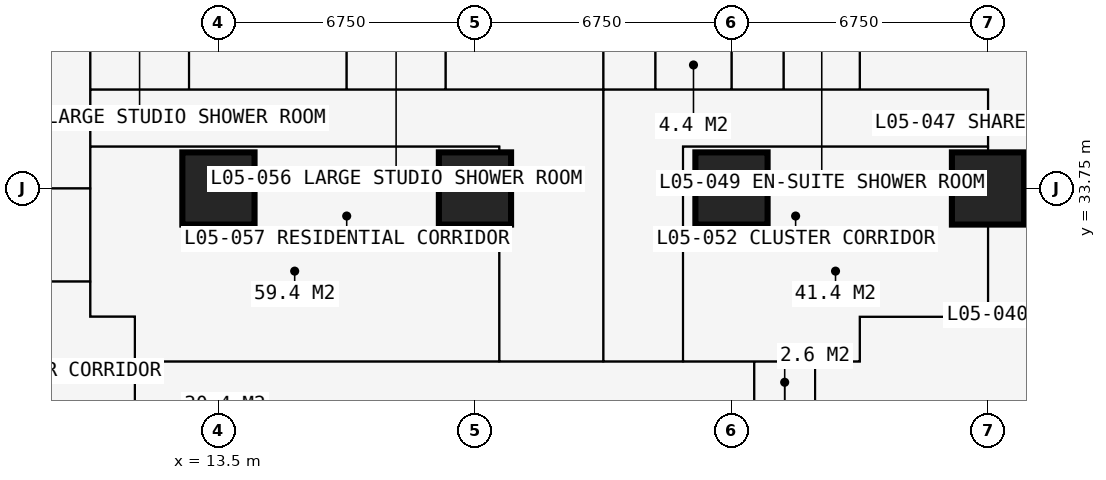
"""IFC4 building model, lengths in metres.
Left out: names, types, materials, properties, quantities, classifications, styles, units other than length and angle.
Written with IfcOpenShell. Run it as: python <this file> out.ifc"""

import sys

from ifc_helpers import new_model, si_unit, direction, frame, frame_2d, origin, origin_2d, place, context, subcontext, project, spatial, rectangle, extrude, element, fill, save


model = new_model("IFC4")
c1 = context("Model", 3, precision=1e-05, world=origin(), true_north=direction((0.0, 1.0)))
c2 = subcontext(c1, "Body", "Model", "MODEL_VIEW")
j1 = project(units=[si_unit("LENGTHUNIT", "METRE"), si_unit("PLANEANGLEUNIT", "RADIAN")], contexts=[c1])
p1 = place(None, origin())
s1 = spatial("IfcSite", under=j1, at=p1, CompositionType="ELEMENT")
p2 = place(p1, origin())
s2 = spatial("IfcBuilding", under=s1, at=p2, CompositionType="ELEMENT")
p3 = place(p2, frame((0.0, 0.0, 21.6)))
s3 = spatial("IfcBuildingStorey", under=s2, at=p3, CompositionType="ELEMENT", Elevation=21.6)
for number, where, z_axis, x_axis in (
    (1, (13.5, 33.75, 0.0), (0.0, 0.0, 1.0), (1.0, 0.0, 0.0)),
    (2, (20.25, 33.75, 0.0), (0.0, 0.0, 1.0), (1.0, 0.0, 0.0)),
    (3, (27.0, 33.75, 0.0), (0.0, 0.0, 1.0), (1.0, 0.0, 0.0)),
    (4, (33.75, 33.75, 0.0), (0.0, 0.0, 1.0), (1.0, 0.0, 0.0)),
):
    element("IfcColumn", number, at=place(p3, frame(where, z_axis=z_axis, x_axis=x_axis)), inside=s3, PredefinedType="COLUMN", context=c2, shape_type="SweptSolid", body=[
        extrude(rectangle(XDim=1.9, YDim=1.9, at=origin_2d()), origin(), (0.0, 0.0, 1.0), 3.6),
    ])
p4 = place(p3, frame((-0.734, 33.75, 0.0), z_axis=(0.0, 0.0, 1.0), x_axis=(1.0, 0.0, 0.0)))
e5 = element("IfcWall", 5, at=p4, inside=s3, PredefinedType="PARTITIONING", context=c2, shape_type="SweptSolid", body=[
    extrude(rectangle(XDim=10.859, YDim=0.15, at=frame_2d((5.429, 0.0))), origin(), (0.0, 0.0, 1.0), 2.877),
])
p5 = place(p4, frame((8.434, 0.0, 0.0)))
e6 = element("IfcOpeningElement", 6, at=p5, cuts=e5, PredefinedType="OPENING", context=c2, shape_type="SweptSolid", body=[
    extrude(rectangle(XDim=1.0, YDim=2.2, at=frame_2d((0.5, 1.1))), frame((0.0, 0.085, 0.0), z_axis=(0.0, -1.0, 0.0), x_axis=(1.0, 0.0, 0.0)), (0.0, 0.0, 1.0), 0.17),
])
p6 = place(p3, frame((5.65, 31.3, 0.0), z_axis=(0.0, 0.0, 1.0), x_axis=(1.0, 0.0, 0.0)))
e7 = element("IfcWall", 7, at=p6, inside=s3, PredefinedType="PARTITIONING", context=c2, shape_type="SweptSolid", body=[
    extrude(rectangle(XDim=4.475, YDim=0.15, at=frame_2d((2.238, 0.0))), origin(), (0.0, 0.0, 1.0), 3.375),
])
p7 = place(p3, frame((10.125, 30.375, 0.0), z_axis=(0.0, 0.0, 1.0), x_axis=(0.0, 1.0, 0.0)))
e8 = element("IfcWall", 8, at=p7, inside=s3, PredefinedType="PARTITIONING", context=c2, shape_type="SweptSolid", body=[
    extrude(rectangle(XDim=10.859, YDim=0.15, at=frame_2d((5.429, 0.0))), origin(), (0.0, 0.0, 1.0), 3.375),
])
p8 = place(p3, frame((10.125, 30.375, 0.0), z_axis=(0.0, 0.0, 1.0), x_axis=(1.0, 0.0, 0.0)))
e9 = element("IfcWall", 9, at=p8, inside=s3, PredefinedType="PARTITIONING", context=c2, shape_type="SweptSolid", body=[
    extrude(rectangle(XDim=1.175, YDim=0.15, at=frame_2d((0.587, 0.0))), origin(), (0.0, 0.0, 1.0), 3.375),
])
p9 = place(p3, frame((10.125, 34.85, 0.0), z_axis=(0.0, 0.0, 1.0), x_axis=(1.0, 0.0, 0.0)))
e10 = element("IfcWall", 10, at=p9, inside=s3, PredefinedType="PARTITIONING", context=c2, shape_type="SweptSolid", body=[
    extrude(rectangle(XDim=10.762, YDim=0.15, at=frame_2d((5.381, 0.0))), origin(), (0.0, 0.0, 1.0), 3.375),
])
p10 = place(p9, frame((4.9, 0.0, 0.0)))
e11 = element("IfcOpeningElement", 11, at=p10, cuts=e10, PredefinedType="OPENING", context=c2, shape_type="SweptSolid", body=[
    extrude(rectangle(XDim=0.95, YDim=2.2, at=frame_2d((0.475, 1.1))), frame((0.0, 0.085, 0.0), z_axis=(0.0, -1.0, 0.0), x_axis=(1.0, 0.0, 0.0)), (0.0, 0.0, 1.0), 0.17),
])
p11 = place(p3, frame((10.125, 36.35, 0.0), z_axis=(0.0, 0.0, 1.0), x_axis=(1.0, 0.0, 0.0)))
e12 = element("IfcWall", 12, at=p11, inside=s3, PredefinedType="PARTITIONING", context=c2, shape_type="SweptSolid", body=[
    extrude(rectangle(XDim=23.625, YDim=0.15, at=frame_2d((11.812, 0.0))), origin(), (0.0, 0.0, 1.0), 3.375),
])
p12 = place(p11, frame((21.45, 0.0, 0.0)))
e13 = element("IfcOpeningElement", 13, at=p12, cuts=e12, PredefinedType="OPENING", context=c2, shape_type="SweptSolid", body=[
    extrude(rectangle(XDim=1.0, YDim=2.2, at=frame_2d((0.5, 1.1))), frame((0.0, 0.085, 0.0), z_axis=(0.0, -1.0, 0.0), x_axis=(1.0, 0.0, 0.0)), (0.0, 0.0, 1.0), 0.17),
])
p13 = place(p11, frame((17.125, 0.0, 0.0)))
e14 = element("IfcOpeningElement", 14, at=p13, cuts=e12, PredefinedType="OPENING", context=c2, shape_type="SweptSolid", body=[
    extrude(rectangle(XDim=0.95, YDim=2.2, at=frame_2d((0.475, 1.1))), frame((0.0, 0.085, 0.0), z_axis=(0.0, -1.0, 0.0), x_axis=(1.0, 0.0, 0.0)), (0.0, 0.0, 1.0), 0.17),
])
p14 = place(p11, frame((13.7, 0.0, 0.0)))
e15 = element("IfcOpeningElement", 15, at=p14, cuts=e12, PredefinedType="OPENING", context=c2, shape_type="SweptSolid", body=[
    extrude(rectangle(XDim=0.95, YDim=2.2, at=frame_2d((0.475, 1.1))), frame((0.0, 0.085, 0.0), z_axis=(0.0, -1.0, 0.0), x_axis=(1.0, 0.0, 0.0)), (0.0, 0.0, 1.0), 0.17),
])
p15 = place(p11, frame((4.2, 0.0, 0.0)))
e16 = element("IfcOpeningElement", 16, at=p15, cuts=e12, PredefinedType="OPENING", context=c2, shape_type="SweptSolid", body=[
    extrude(rectangle(XDim=0.95, YDim=2.2, at=frame_2d((0.475, 1.1))), frame((0.0, 0.085, 0.0), z_axis=(0.0, -1.0, 0.0), x_axis=(1.0, 0.0, 0.0)), (0.0, 0.0, 1.0), 0.17),
])
p16 = place(p11, frame((10.95, 0.0, 0.0)))
e17 = element("IfcOpeningElement", 17, at=p16, cuts=e12, PredefinedType="OPENING", context=c2, shape_type="SweptSolid", body=[
    extrude(rectangle(XDim=0.95, YDim=2.2, at=frame_2d((0.475, 1.1))), frame((0.0, 0.085, 0.0), z_axis=(0.0, -1.0, 0.0), x_axis=(1.0, 0.0, 0.0)), (0.0, 0.0, 1.0), 0.17),
])
p17 = place(p3, frame((11.3, 11.3, 0.0), z_axis=(0.0, 0.0, 1.0), x_axis=(0.0, 1.0, 0.0)))
e18 = element("IfcWall", 18, at=p17, inside=s3, PredefinedType="PARTITIONING", context=c2, shape_type="SweptSolid", body=[
    extrude(rectangle(XDim=19.075, YDim=0.15, at=frame_2d((9.538, 0.0))), origin(), (0.0, 0.0, 1.0), 3.375),
])
p18 = place(p17, frame((12.875, 0.0, 0.0)))
e19 = element("IfcOpeningElement", 19, at=p18, cuts=e18, PredefinedType="OPENING", context=c2, shape_type="SweptSolid", body=[
    extrude(rectangle(XDim=1.0, YDim=2.2, at=frame_2d((0.5, 1.1))), frame((0.0, 0.085, 0.0), z_axis=(0.0, -1.0, 0.0), x_axis=(1.0, 0.0, 0.0)), (0.0, 0.0, 1.0), 0.17),
])
p19 = place(p17, frame((10.438, 0.0, 0.0)))
e20 = element("IfcOpeningElement", 20, at=p19, cuts=e18, PredefinedType="OPENING", context=c2, shape_type="SweptSolid", body=[
    extrude(rectangle(XDim=1.0, YDim=2.2, at=frame_2d((0.5, 1.1))), frame((0.0, 0.085, 0.0), z_axis=(0.0, -1.0, 0.0), x_axis=(1.0, 0.0, 0.0)), (0.0, 0.0, 1.0), 0.17),
])
p20 = place(p17, frame((15.675, 0.0, 0.0)))
e21 = element("IfcOpeningElement", 21, at=p20, cuts=e18, PredefinedType="OPENING", context=c2, shape_type="SweptSolid", body=[
    extrude(rectangle(XDim=0.95, YDim=2.2, at=frame_2d((0.475, 1.1))), frame((0.0, 0.085, 0.0), z_axis=(0.0, -1.0, 0.0), x_axis=(1.0, 0.0, 0.0)), (0.0, 0.0, 1.0), 0.17),
])
p21 = place(p3, frame((11.3, 29.2, 0.0), z_axis=(0.0, 0.0, 1.0), x_axis=(1.0, 0.0, 0.0)))
e22 = element("IfcWall", 22, at=p21, inside=s3, PredefinedType="PARTITIONING", context=c2, shape_type="SweptSolid", body=[
    extrude(rectangle(XDim=19.075, YDim=0.15, at=frame_2d((9.538, 0.0))), origin(), (0.0, 0.0, 1.0), 3.375),
])
p22 = place(p21, frame((12.875, 0.0, 0.0)))
e23 = element("IfcOpeningElement", 23, at=p22, cuts=e22, PredefinedType="OPENING", context=c2, shape_type="SweptSolid", body=[
    extrude(rectangle(XDim=1.0, YDim=2.2, at=frame_2d((0.5, 1.1))), frame((0.0, 0.085, 0.0), z_axis=(0.0, -1.0, 0.0), x_axis=(1.0, 0.0, 0.0)), (0.0, 0.0, 1.0), 0.17),
])
p23 = place(p21, frame((10.438, 0.0, 0.0)))
e24 = element("IfcOpeningElement", 24, at=p23, cuts=e22, PredefinedType="OPENING", context=c2, shape_type="SweptSolid", body=[
    extrude(rectangle(XDim=1.0, YDim=2.2, at=frame_2d((0.5, 1.1))), frame((0.0, 0.085, 0.0), z_axis=(0.0, -1.0, 0.0), x_axis=(1.0, 0.0, 0.0)), (0.0, 0.0, 1.0), 0.17),
])
p24 = place(p21, frame((14.875, 0.0, 0.0)))
e25 = element("IfcOpeningElement", 25, at=p24, cuts=e22, PredefinedType="OPENING", context=c2, shape_type="SweptSolid", body=[
    extrude(rectangle(XDim=0.95, YDim=2.2, at=frame_2d((0.475, 1.1))), frame((0.0, 0.085, 0.0), z_axis=(0.0, -1.0, 0.0), x_axis=(1.0, 0.0, 0.0)), (0.0, 0.0, 1.0), 0.17),
])
p25 = place(p3, frame((12.725, 36.35, 0.0), z_axis=(0.0, 0.0, 1.0), x_axis=(0.0, 1.0, 0.0)))
e26 = element("IfcWall", 26, at=p25, inside=s3, PredefinedType="PARTITIONING", context=c2, shape_type="SweptSolid", body=[
    extrude(rectangle(XDim=2.4, YDim=0.1, at=frame_2d((1.2, 0.0))), origin(), (0.0, 0.0, 1.0), 3.375),
])
p26 = place(p3, frame((16.875, 36.35, 0.0), z_axis=(0.0, 0.0, 1.0), x_axis=(0.0, 1.0, 0.0)))
e27 = element("IfcWall", 27, at=p26, inside=s3, PredefinedType="PARTITIONING", context=c2, shape_type="SweptSolid", body=[
    extrude(rectangle(XDim=4.884, YDim=0.175, at=frame_2d((2.442, 0.0))), origin(), (0.0, 0.0, 1.0), 3.375),
])
p27 = place(p26, frame((0.75, 0.0, 0.0)))
e28 = element("IfcOpeningElement", 28, at=p27, cuts=e27, PredefinedType="OPENING", context=c2, shape_type="SweptSolid", body=[
    extrude(rectangle(XDim=0.9, YDim=2.2, at=frame_2d((0.45, 1.1))), frame((0.0, 0.097, 0.0), z_axis=(0.0, -1.0, 0.0), x_axis=(1.0, 0.0, 0.0)), (0.0, 0.0, 1.0), 0.195),
])
p28 = place(p3, frame((19.475, 36.35, 0.0), z_axis=(0.0, 0.0, 1.0), x_axis=(0.0, 1.0, 0.0)))
e29 = element("IfcWall", 29, at=p28, inside=s3, PredefinedType="PARTITIONING", context=c2, shape_type="SweptSolid", body=[
    extrude(rectangle(XDim=2.4, YDim=0.1, at=frame_2d((1.2, 0.0))), origin(), (0.0, 0.0, 1.0), 3.375),
])
p29 = place(p3, frame((20.887, 29.2, 0.0), z_axis=(0.0, 0.0, 1.0), x_axis=(0.0, 1.0, 0.0)))
e30 = element("IfcWall", 30, at=p29, inside=s3, PredefinedType="PARTITIONING", context=c2, shape_type="SweptSolid", body=[
    extrude(rectangle(XDim=5.65, YDim=0.15, at=frame_2d((2.825, 0.0))), origin(), (0.0, 0.0, 1.0), 3.375),
])
p30 = place(p3, frame((23.625, 29.2, 0.0), z_axis=(0.0, 0.0, 1.0), x_axis=(0.0, 1.0, 0.0)))
e31 = element("IfcWall", 31, at=p30, inside=s3, PredefinedType="PARTITIONING", context=c2, shape_type="SweptSolid", body=[
    extrude(rectangle(XDim=12.034, YDim=0.15, at=frame_2d((6.017, 0.0))), origin(), (0.0, 0.0, 1.0), 3.375),
])
p31 = place(p3, frame((25.0, 36.35, 0.0), z_axis=(0.0, 0.0, 1.0), x_axis=(0.0, 1.0, 0.0)))
e32 = element("IfcWall", 32, at=p31, inside=s3, PredefinedType="PARTITIONING", context=c2, shape_type="SweptSolid", body=[
    extrude(rectangle(XDim=2.2, YDim=0.1, at=frame_2d((1.1, 0.0))), origin(), (0.0, 0.0, 1.0), 3.375),
])
p32 = place(p3, frame((25.725, 29.2, 0.0), z_axis=(0.0, 0.0, 1.0), x_axis=(0.0, 1.0, 0.0)))
e33 = element("IfcWall", 33, at=p32, inside=s3, PredefinedType="PARTITIONING", context=c2, shape_type="SweptSolid", body=[
    extrude(rectangle(XDim=5.65, YDim=0.15, at=frame_2d((2.825, 0.0))), origin(), (0.0, 0.0, 1.0), 3.375),
])
p33 = place(p3, frame((25.725, 34.85, 0.0), z_axis=(0.0, 0.0, 1.0), x_axis=(1.0, 0.0, 0.0)))
e34 = element("IfcWall", 34, at=p33, inside=s3, PredefinedType="PARTITIONING", context=c2, shape_type="SweptSolid", body=[
    extrude(rectangle(XDim=8.025, YDim=0.15, at=frame_2d((4.012, 0.0))), origin(), (0.0, 0.0, 1.0), 3.375),
])
p34 = place(p3, frame((27.0, 36.35, 0.0), z_axis=(0.0, 0.0, 1.0), x_axis=(0.0, 1.0, 0.0)))
e35 = element("IfcWall", 35, at=p34, inside=s3, PredefinedType="PARTITIONING", context=c2, shape_type="SweptSolid", body=[
    extrude(rectangle(XDim=4.884, YDim=0.175, at=frame_2d((2.442, 0.0))), origin(), (0.0, 0.0, 1.0), 2.877),
])
p35 = place(p34, frame((0.65, 0.0, 0.0)))
e36 = element("IfcOpeningElement", 36, at=p35, cuts=e35, PredefinedType="OPENING", context=c2, shape_type="SweptSolid", body=[
    extrude(rectangle(XDim=0.9, YDim=2.2, at=frame_2d((0.45, 1.1))), frame((0.0, 0.097, 0.0), z_axis=(0.0, -1.0, 0.0), x_axis=(1.0, 0.0, 0.0)), (0.0, 0.0, 1.0), 0.195),
])
p36 = place(p3, frame((27.6, 27.6, 0.0), z_axis=(0.0, 0.0, 1.0), x_axis=(0.0, 1.0, 0.0)))
e37 = element("IfcWall", 37, at=p36, inside=s3, PredefinedType="PARTITIONING", context=c2, shape_type="SweptSolid", body=[
    extrude(rectangle(XDim=1.6, YDim=0.15, at=frame_2d((0.8, 0.0))), origin(), (0.0, 0.0, 1.0), 3.375),
])
p37 = place(p36, frame((0.3, 0.0, 0.0)))
e38 = element("IfcOpeningElement", 38, at=p37, cuts=e37, PredefinedType="OPENING", context=c2, shape_type="SweptSolid", body=[
    extrude(rectangle(XDim=0.95, YDim=2.2, at=frame_2d((0.475, 1.1))), frame((0.0, 0.085, 0.0), z_axis=(0.0, -1.0, 0.0), x_axis=(1.0, 0.0, 0.0)), (0.0, 0.0, 1.0), 0.17),
])
p38 = place(p3, frame((28.375, 36.35, 0.0), z_axis=(0.0, 0.0, 1.0), x_axis=(0.0, 1.0, 0.0)))
e39 = element("IfcWall", 39, at=p38, inside=s3, PredefinedType="PARTITIONING", context=c2, shape_type="SweptSolid", body=[
    extrude(rectangle(XDim=2.2, YDim=0.1, at=frame_2d((1.1, 0.0))), origin(), (0.0, 0.0, 1.0), 3.375),
])
p39 = place(p38, frame((0.65, 0.0, 0.0)))
e40 = element("IfcOpeningElement", 40, at=p39, cuts=e39, PredefinedType="OPENING", context=c2, shape_type="SweptSolid", body=[
    extrude(rectangle(XDim=0.9, YDim=2.2, at=frame_2d((0.45, 1.1))), frame((0.0, 0.06, 0.0), z_axis=(0.0, -1.0, 0.0), x_axis=(1.0, 0.0, 0.0)), (0.0, 0.0, 1.0), 0.12),
])
p40 = place(p3, frame((29.2, 11.3, 0.0), z_axis=(0.0, 0.0, 1.0), x_axis=(0.0, 1.0, 0.0)))
e41 = element("IfcWall", 41, at=p40, inside=s3, PredefinedType="PARTITIONING", context=c2, shape_type="SweptSolid", body=[
    extrude(rectangle(XDim=17.9, YDim=0.2, at=frame_2d((8.95, 0.0))), origin(), (0.0, 0.0, 1.0), 3.375),
])
p41 = place(p40, frame((8.35, 0.0, 0.0)))
e42 = element("IfcOpeningElement", 42, at=p41, cuts=e41, PredefinedType="OPENING", context=c2, shape_type="SweptSolid", body=[
    extrude(rectangle(XDim=1.2, YDim=2.2, at=frame_2d((0.6, 1.1))), frame((0.0, 0.11, 0.0), z_axis=(0.0, -1.0, 0.0), x_axis=(1.0, 0.0, 0.0)), (0.0, 0.0, 1.0), 0.22),
])
p42 = place(p3, frame((30.375, 29.2, 0.0), z_axis=(0.0, 0.0, 1.0), x_axis=(0.0, 1.0, 0.0)))
e43 = element("IfcWall", 43, at=p42, inside=s3, PredefinedType="PARTITIONING", context=c2, shape_type="SweptSolid", body=[
    extrude(rectangle(XDim=1.175, YDim=0.15, at=frame_2d((0.587, 0.0))), origin(), (0.0, 0.0, 1.0), 3.375),
])
p43 = place(p3, frame((30.375, 30.375, 0.0), z_axis=(0.0, 0.0, 1.0), x_axis=(1.0, 0.0, 0.0)))
e44 = element("IfcWall", 44, at=p43, inside=s3, PredefinedType="PARTITIONING", context=c2, shape_type="SweptSolid", body=[
    extrude(rectangle(XDim=10.859, YDim=0.15, at=frame_2d((5.429, 0.0))), origin(), (0.0, 0.0, 1.0), 3.375),
])
p44 = place(p3, frame((30.375, 36.35, 0.0), z_axis=(0.0, 0.0, 1.0), x_axis=(0.0, 1.0, 0.0)))
e45 = element("IfcWall", 45, at=p44, inside=s3, PredefinedType="PARTITIONING", context=c2, shape_type="SweptSolid", body=[
    extrude(rectangle(XDim=4.884, YDim=0.15, at=frame_2d((2.442, 0.0))), origin(), (0.0, 0.0, 1.0), 3.375),
])
p45 = place(p3, frame((33.75, 30.375, 0.0), z_axis=(0.0, 0.0, 1.0), x_axis=(0.0, 1.0, 0.0)))
e46 = element("IfcWall", 46, at=p45, inside=s3, PredefinedType="PARTITIONING", context=c2, shape_type="SweptSolid", body=[
    extrude(rectangle(XDim=5.975, YDim=0.15, at=frame_2d((2.988, 0.0))), origin(), (0.0, 0.0, 1.0), 2.877),
])
p46 = place(p37, origin())
e47 = element("IfcDoor", 47, at=p46, inside=s3, OperationType="SINGLE_SWING_LEFT", PredefinedType="DOOR", context=c2, shape_type="SweptSolid", body=[
    extrude(rectangle(XDim=0.95, YDim=2.2, at=frame_2d((0.475, 1.1))), frame((0.0, 0.025, 0.0), z_axis=(0.0, -1.0, 0.0), x_axis=(1.0, 0.0, 0.0)), (0.0, 0.0, 1.0), 0.05),
])
fill(e38, e47)
p47 = place(p12, origin())
e48 = element("IfcDoor", 48, at=p47, inside=s3, OperationType="SINGLE_SWING_LEFT", PredefinedType="DOOR", context=c2, shape_type="SweptSolid", body=[
    extrude(rectangle(XDim=1.0, YDim=2.2, at=frame_2d((0.5, 1.1))), frame((0.0, 0.025, 0.0), z_axis=(0.0, -1.0, 0.0), x_axis=(1.0, 0.0, 0.0)), (0.0, 0.0, 1.0), 0.05),
])
fill(e13, e48)
p48 = place(p13, origin())
e49 = element("IfcDoor", 49, at=p48, inside=s3, OperationType="SINGLE_SWING_LEFT", PredefinedType="DOOR", context=c2, shape_type="SweptSolid", body=[
    extrude(rectangle(XDim=0.95, YDim=2.2, at=frame_2d((0.475, 1.1))), frame((0.0, 0.025, 0.0), z_axis=(0.0, -1.0, 0.0), x_axis=(1.0, 0.0, 0.0)), (0.0, 0.0, 1.0), 0.05),
])
fill(e14, e49)
p49 = place(p39, origin())
e50 = element("IfcDoor", 50, at=p49, inside=s3, OperationType="SINGLE_SWING_RIGHT", PredefinedType="DOOR", context=c2, shape_type="SweptSolid", body=[
    extrude(rectangle(XDim=0.9, YDim=2.2, at=frame_2d((0.45, 1.1))), frame((0.0, 0.025, 0.0), z_axis=(0.0, -1.0, 0.0), x_axis=(1.0, 0.0, 0.0)), (0.0, 0.0, 1.0), 0.05),
])
fill(e40, e50)
p50 = place(p14, origin())
e51 = element("IfcDoor", 51, at=p50, inside=s3, OperationType="SINGLE_SWING_LEFT", PredefinedType="DOOR", context=c2, shape_type="SweptSolid", body=[
    extrude(rectangle(XDim=0.95, YDim=2.2, at=frame_2d((0.475, 1.1))), frame((0.0, 0.025, 0.0), z_axis=(0.0, -1.0, 0.0), x_axis=(1.0, 0.0, 0.0)), (0.0, 0.0, 1.0), 0.05),
])
fill(e15, e51)
p51 = place(p35, origin())
e52 = element("IfcDoor", 52, at=p51, inside=s3, OperationType="SINGLE_SWING_RIGHT", PredefinedType="DOOR", context=c2, shape_type="SweptSolid", body=[
    extrude(rectangle(XDim=0.9, YDim=2.2, at=frame_2d((0.45, 1.1))), frame((0.0, 0.025, 0.0), z_axis=(0.0, -1.0, 0.0), x_axis=(1.0, 0.0, 0.0)), (0.0, 0.0, 1.0), 0.05),
])
fill(e36, e52)
p52 = place(p22, origin())
e53 = element("IfcDoor", 53, at=p52, inside=s3, OperationType="SINGLE_SWING_LEFT", PredefinedType="DOOR", context=c2, shape_type="SweptSolid", body=[
    extrude(rectangle(XDim=1.0, YDim=2.2, at=frame_2d((0.5, 1.1))), frame((0.0, 0.025, 0.0), z_axis=(0.0, -1.0, 0.0), x_axis=(1.0, 0.0, 0.0)), (0.0, 0.0, 1.0), 0.05),
])
fill(e23, e53)
p53 = place(p15, origin())
e54 = element("IfcDoor", 54, at=p53, inside=s3, OperationType="SINGLE_SWING_LEFT", PredefinedType="DOOR", context=c2, shape_type="SweptSolid", body=[
    extrude(rectangle(XDim=0.95, YDim=2.2, at=frame_2d((0.475, 1.1))), frame((0.0, 0.025, 0.0), z_axis=(0.0, -1.0, 0.0), x_axis=(1.0, 0.0, 0.0)), (0.0, 0.0, 1.0), 0.05),
])
fill(e16, e54)
p54 = place(p16, origin())
e55 = element("IfcDoor", 55, at=p54, inside=s3, OperationType="SINGLE_SWING_LEFT", PredefinedType="DOOR", context=c2, shape_type="SweptSolid", body=[
    extrude(rectangle(XDim=0.95, YDim=2.2, at=frame_2d((0.475, 1.1))), frame((0.0, 0.025, 0.0), z_axis=(0.0, -1.0, 0.0), x_axis=(1.0, 0.0, 0.0)), (0.0, 0.0, 1.0), 0.05),
])
fill(e17, e55)
p55 = place(p27, origin())
e56 = element("IfcDoor", 56, at=p55, inside=s3, OperationType="SINGLE_SWING_RIGHT", PredefinedType="DOOR", context=c2, shape_type="SweptSolid", body=[
    extrude(rectangle(XDim=0.9, YDim=2.2, at=frame_2d((0.45, 1.1))), frame((0.0, 0.025, 0.0), z_axis=(0.0, -1.0, 0.0), x_axis=(1.0, 0.0, 0.0)), (0.0, 0.0, 1.0), 0.05),
])
fill(e28, e56)
p56 = place(p23, origin())
e57 = element("IfcDoor", 57, at=p56, inside=s3, OperationType="SINGLE_SWING_LEFT", PredefinedType="DOOR", context=c2, shape_type="SweptSolid", body=[
    extrude(rectangle(XDim=1.0, YDim=2.2, at=frame_2d((0.5, 1.1))), frame((0.0, 0.025, 0.0), z_axis=(0.0, -1.0, 0.0), x_axis=(1.0, 0.0, 0.0)), (0.0, 0.0, 1.0), 0.05),
])
fill(e24, e57)
p57 = place(p24, origin())
e58 = element("IfcDoor", 58, at=p57, inside=s3, OperationType="SINGLE_SWING_LEFT", PredefinedType="DOOR", context=c2, shape_type="SweptSolid", body=[
    extrude(rectangle(XDim=0.95, YDim=2.2, at=frame_2d((0.475, 1.1))), frame((0.0, 0.025, 0.0), z_axis=(0.0, -1.0, 0.0), x_axis=(1.0, 0.0, 0.0)), (0.0, 0.0, 1.0), 0.05),
])
fill(e25, e58)
p58 = place(p10, origin())
e59 = element("IfcDoor", 59, at=p58, inside=s3, OperationType="SINGLE_SWING_LEFT", PredefinedType="DOOR", context=c2, shape_type="SweptSolid", body=[
    extrude(rectangle(XDim=0.95, YDim=2.2, at=frame_2d((0.475, 1.1))), frame((0.0, 0.025, 0.0), z_axis=(0.0, -1.0, 0.0), x_axis=(1.0, 0.0, 0.0)), (0.0, 0.0, 1.0), 0.05),
])
fill(e11, e59)
save(model, sys.argv[1])
